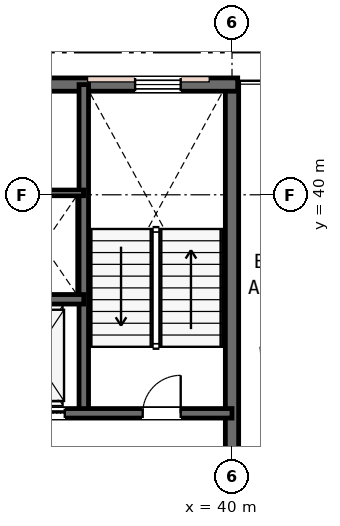
"""IFC4 building model, lengths in metres.
Left out: names, types, materials, properties, quantities, classifications, styles, units other than length and angle.
Written with IfcOpenShell. Run it as: python <this file> out.ifc"""

import sys

from ifc_helpers import new_model, si_unit, direction, frame, frame_2d, origin, place, context, subcontext, project, spatial, rectangle, extrude, element, fill, save


model = new_model("IFC4")
c1 = context("Model", 3, precision=1e-05, world=origin(), true_north=direction((0.0, 1.0)))
c2 = subcontext(c1, "Body", "Model", "MODEL_VIEW")
j1 = project(units=[si_unit("LENGTHUNIT", "METRE"), si_unit("PLANEANGLEUNIT", "RADIAN")], contexts=[c1])
p1 = place(None, origin())
s1 = spatial("IfcSite", under=j1, at=p1, CompositionType="ELEMENT")
p2 = place(p1, origin())
s2 = spatial("IfcBuilding", under=s1, at=p2, CompositionType="ELEMENT")
p3 = place(p2, frame((0.0, 0.0, 204.6)))
s3 = spatial("IfcBuildingStorey", under=s2, at=p3, CompositionType="ELEMENT", Elevation=204.6)
p4 = place(p3, frame((40.0, 30.65, 0.0), z_axis=(0.0, 0.0, 1.0), x_axis=(0.0, 1.0, 0.0)))
e1 = element("IfcWall", 1, at=p4, inside=s3, PredefinedType="SHEAR", context=c2, shape_type="SweptSolid", body=[
    extrude(rectangle(XDim=12.3, YDim=0.35, at=frame_2d((6.15, 0.0))), origin(), (0.0, 0.0, 1.0), 3.6),
])
p5 = place(p3, frame((15.85, 42.9, 0.0), z_axis=(0.0, 0.0, 1.0), x_axis=(1.0, 0.0, 0.0)))
e2 = element("IfcWall", 2, at=p5, inside=s3, PredefinedType="SHEAR", context=c2, shape_type="SweptSolid", body=[
    extrude(rectangle(XDim=24.3, YDim=0.35, at=frame_2d((12.15, 0.0))), origin(), (0.0, 0.0, 1.0), 3.6),
])
p6 = place(p5, frame((1.6, 0.0, 0.95)))
e3 = element("IfcOpeningElement", 3, at=p6, cuts=e2, PredefinedType="OPENING", context=c2, shape_type="SweptSolid", body=[
    extrude(rectangle(XDim=1.2, YDim=1.6, at=frame_2d((0.6, 0.8))), frame((0.0, 0.185, 0.0), z_axis=(0.0, -1.0, 0.0), x_axis=(1.0, 0.0, 0.0)), (0.0, 0.0, 1.0), 0.37),
])
p7 = place(p5, frame((16.5, 0.0, 0.95)))
e4 = element("IfcOpeningElement", 4, at=p7, cuts=e2, PredefinedType="OPENING", context=c2, shape_type="SweptSolid", body=[
    extrude(rectangle(XDim=1.2, YDim=1.6, at=frame_2d((0.6, 0.8))), frame((0.0, 0.185, 0.0), z_axis=(0.0, -1.0, 0.0), x_axis=(1.0, 0.0, 0.0)), (0.0, 0.0, 1.0), 0.37),
])
p8 = place(p5, frame((21.6, 0.0, 0.95)))
e5 = element("IfcOpeningElement", 5, at=p8, cuts=e2, PredefinedType="OPENING", context=c2, shape_type="SweptSolid", body=[
    extrude(rectangle(XDim=1.2, YDim=1.6, at=frame_2d((0.6, 0.8))), frame((0.0, 0.185, 0.0), z_axis=(0.0, -1.0, 0.0), x_axis=(1.0, 0.0, 0.0)), (0.0, 0.0, 1.0), 0.37),
])
p9 = place(p3, frame((36.1, 34.25, 0.0), z_axis=(0.0, 0.0, 1.0), x_axis=(0.0, 1.0, 0.0)))
e6 = element("IfcWall", 6, at=p9, inside=s3, PredefinedType="SHEAR", context=c2, shape_type="SweptSolid", body=[
    extrude(rectangle(XDim=8.65, YDim=0.25, at=frame_2d((4.325, 0.0))), origin(), (0.0, 0.0, 1.0), 3.6),
])
p10 = place(p3, frame((33.95, 34.25, 0.0), z_axis=(0.0, 0.0, 1.0), x_axis=(1.0, 0.0, 0.0)))
e7 = element("IfcWall", 7, at=p10, inside=s3, PredefinedType="SHEAR", context=c2, shape_type="SweptSolid", body=[
    extrude(rectangle(XDim=6.05, YDim=0.25, at=frame_2d((3.025, 0.0))), origin(), (0.0, 0.0, 1.0), 3.6),
])
p11 = place(p10, frame((3.7, 0.0, 0.0)))
e8 = element("IfcOpeningElement", 8, at=p11, cuts=e7, PredefinedType="OPENING", context=c2, shape_type="SweptSolid", body=[
    extrude(rectangle(XDim=1.0, YDim=2.15, at=frame_2d((0.5, 1.075))), frame((0.0, 0.135, 0.0), z_axis=(0.0, -1.0, 0.0), x_axis=(1.0, 0.0, 0.0)), (0.0, 0.0, 1.0), 0.27),
])
p12 = place(p10, frame((0.55, 0.0, 0.0)))
e9 = element("IfcOpeningElement", 9, at=p12, cuts=e7, PredefinedType="OPENING", context=c2, shape_type="SweptSolid", body=[
    extrude(rectangle(XDim=1.1, YDim=2.15, at=frame_2d((0.55, 1.075))), frame((0.0, 0.135, 0.0), z_axis=(0.0, -1.0, 0.0), x_axis=(1.0, 0.0, 0.0)), (0.0, 0.0, 1.0), 0.27),
])
p13 = place(p3, frame((19.9, 37.25, 0.0), z_axis=(0.0, 0.0, 1.0), x_axis=(1.0, 0.0, 0.0)))
e10 = element("IfcWall", 10, at=p13, inside=s3, PredefinedType="SHEAR", context=c2, shape_type="SweptSolid", body=[
    extrude(rectangle(XDim=16.2, YDim=0.25, at=frame_2d((8.1, 0.0))), origin(), (0.0, 0.0, 1.0), 3.6),
])
p14 = place(p13, frame((12.55, 0.0, 0.0)))
e11 = element("IfcOpeningElement", 11, at=p14, cuts=e10, PredefinedType="OPENING", context=c2, shape_type="SweptSolid", body=[
    extrude(rectangle(XDim=0.9, YDim=2.15, at=frame_2d((0.45, 1.075))), frame((0.0, 0.135, 0.0), z_axis=(0.0, -1.0, 0.0), x_axis=(1.0, 0.0, 0.0)), (0.0, 0.0, 1.0), 0.27),
])
p15 = place(p13, frame((2.5, 0.0, 0.0)))
e12 = element("IfcOpeningElement", 12, at=p15, cuts=e10, PredefinedType="OPENING", context=c2, shape_type="SweptSolid", body=[
    extrude(rectangle(XDim=1.05, YDim=2.15, at=frame_2d((0.525, 1.075))), frame((0.0, 0.135, 0.0), z_axis=(0.0, -1.0, 0.0), x_axis=(1.0, 0.0, 0.0)), (0.0, 0.0, 1.0), 0.27),
])
p16 = place(p13, frame((4.4, 0.0, 0.0)))
e13 = element("IfcOpeningElement", 13, at=p16, cuts=e10, PredefinedType="OPENING", context=c2, shape_type="SweptSolid", body=[
    extrude(rectangle(XDim=1.05, YDim=2.15, at=frame_2d((0.525, 1.075))), frame((0.0, 0.135, 0.0), z_axis=(0.0, -1.0, 0.0), x_axis=(1.0, 0.0, 0.0)), (0.0, 0.0, 1.0), 0.27),
])
p17 = place(p13, frame((6.3, 0.0, 0.0)))
e14 = element("IfcOpeningElement", 14, at=p17, cuts=e10, PredefinedType="OPENING", context=c2, shape_type="SweptSolid", body=[
    extrude(rectangle(XDim=1.05, YDim=2.15, at=frame_2d((0.525, 1.075))), frame((0.0, 0.135, 0.0), z_axis=(0.0, -1.0, 0.0), x_axis=(1.0, 0.0, 0.0)), (0.0, 0.0, 1.0), 0.27),
])
p18 = place(p3, frame((34.05, 40.05, 0.0), z_axis=(0.0, 0.0, 1.0), x_axis=(1.0, 0.0, 0.0)))
e15 = element("IfcWall", 15, at=p18, inside=s3, PredefinedType="PARTITIONING", context=c2, shape_type="SweptSolid", body=[
    extrude(rectangle(XDim=2.05, YDim=0.15, at=frame_2d((1.025, 0.0))), origin(), (0.0, 0.0, 1.0), 3.24),
])
p19 = place(p8, origin())
e16 = element("IfcWindow", 16, at=p19, inside=s3, PartitioningType="SINGLE_PANEL", PredefinedType="WINDOW", context=c2, shape_type="SweptSolid", body=[
    extrude(rectangle(XDim=1.2, YDim=1.6, at=frame_2d((0.6, 0.8))), frame((0.0, 0.03, 0.0), z_axis=(0.0, -1.0, 0.0), x_axis=(1.0, 0.0, 0.0)), (0.0, 0.0, 1.0), 0.06),
])
fill(e5, e16)
p20 = place(p11, origin())
e17 = element("IfcDoor", 17, at=p20, inside=s3, OperationType="SINGLE_SWING_RIGHT", PredefinedType="DOOR", context=c2, shape_type="SweptSolid", body=[
    extrude(rectangle(XDim=1.0, YDim=2.15, at=frame_2d((0.5, 1.075))), frame((0.0, 0.025, 0.0), z_axis=(0.0, -1.0, 0.0), x_axis=(1.0, 0.0, 0.0)), (0.0, 0.0, 1.0), 0.05),
])
fill(e8, e17)
p21 = place(p12, origin())
e18 = element("IfcDoor", 18, at=p21, inside=s3, OperationType="DOUBLE_DOOR_SLIDING", PredefinedType="DOOR", context=c2, shape_type="SweptSolid", body=[
    extrude(rectangle(XDim=1.1, YDim=2.15, at=frame_2d((0.55, 1.075))), frame((0.0, 0.025, 0.0), z_axis=(0.0, -1.0, 0.0), x_axis=(1.0, 0.0, 0.0)), (0.0, 0.0, 1.0), 0.05),
])
fill(e9, e18)
save(model, sys.argv[1])
